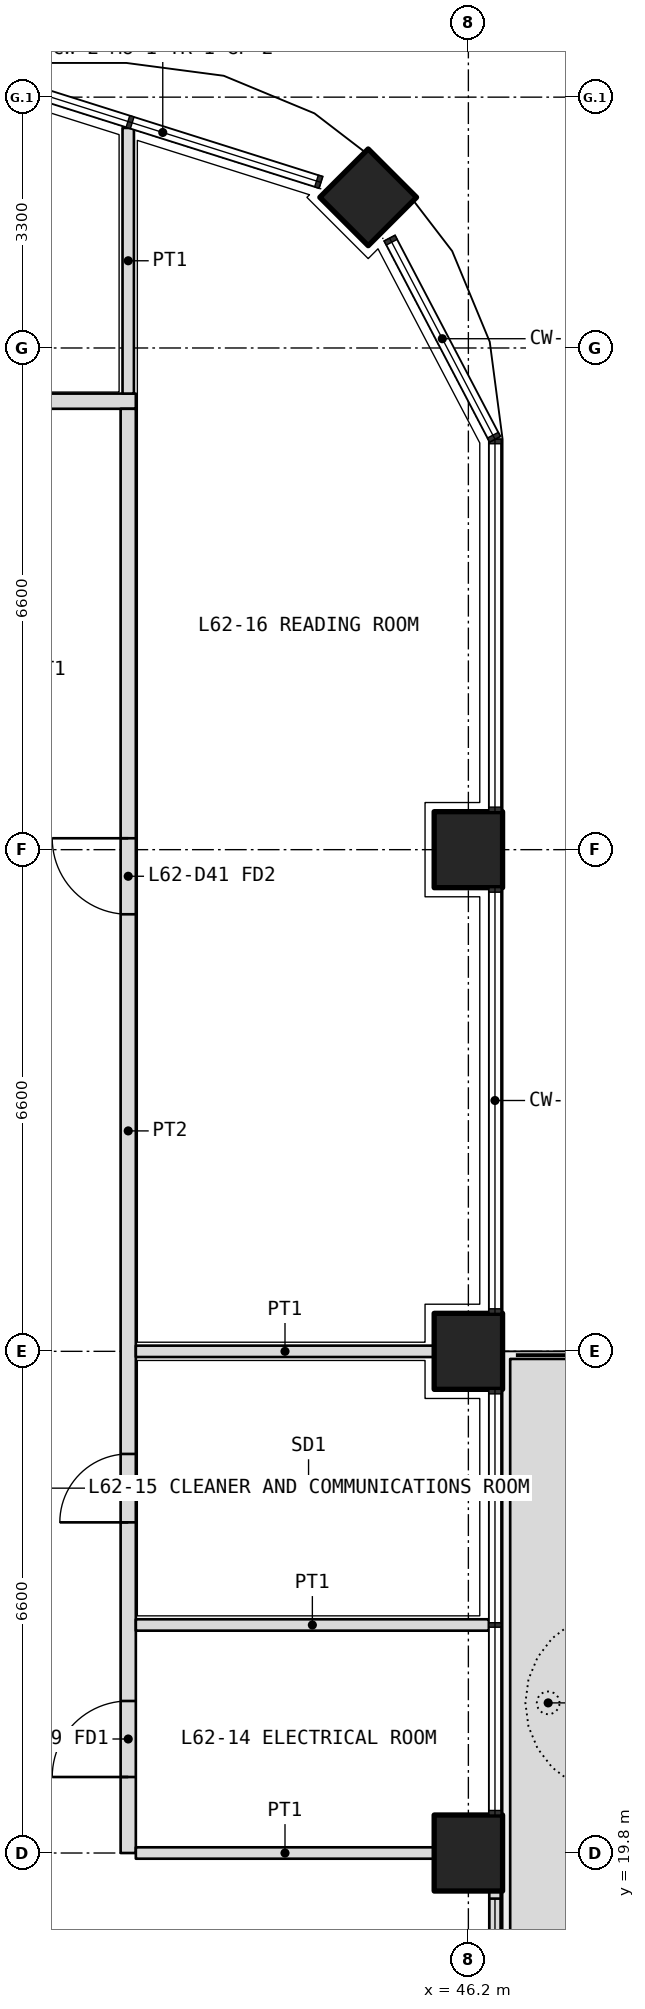
"""IFC4 building model, lengths in metres.
Left out: names, types, materials, properties, quantities, classifications, styles, units other than length and angle.
Written with IfcOpenShell. Run it as: python <this file> out.ifc"""

import sys

from ifc_helpers import new_model, si_unit, direction, frame, frame_2d, origin, origin_2d, place, context, subcontext, project, spatial, polyline, rectangle, outline, extrude, element, fill, save


model = new_model("IFC4")
c1 = context("Model", 3, precision=1e-05, world=origin(), true_north=direction((0.0, 1.0)))
c2 = subcontext(c1, "Body", "Model", "MODEL_VIEW")
j1 = project(units=[si_unit("LENGTHUNIT", "METRE"), si_unit("PLANEANGLEUNIT", "RADIAN")], contexts=[c1])
p1 = place(None, origin())
s1 = spatial("IfcSite", under=j1, at=p1, CompositionType="ELEMENT")
p2 = place(p1, origin())
s2 = spatial("IfcBuilding", under=s1, at=p2, CompositionType="ELEMENT")
p3 = place(p2, frame((0.0, 0.0, 271.2)))
s3 = spatial("IfcBuildingStorey", under=s2, at=p3, CompositionType="ELEMENT", Elevation=271.2)
p4 = place(p3, frame((44.882, 41.582, 0.0), z_axis=(0.0, 0.0, 1.0), x_axis=(0.707106781187, 0.707106781187, 0.0)))
e1 = element("IfcColumn", 1, at=p4, inside=s3, PredefinedType="COLUMN", context=c2, shape_type="SweptSolid", body=[
    extrude(rectangle(XDim=0.9, YDim=0.9, at=origin_2d()), origin(), (0.0, 0.0, 1.0), 4.2),
])
for number, where, z_axis, x_axis in (
    (2, (46.2, 19.8, 0.0), (0.0, 0.0, 1.0), (0.0, 1.0, 0.0)),
    (3, (46.2, 26.4, 0.0), (0.0, 0.0, 1.0), (0.0, 1.0, 0.0)),
    (4, (46.2, 33.0, 0.0), (0.0, 0.0, 1.0), (0.0, 1.0, 0.0)),
):
    element("IfcColumn", number, at=place(p3, frame(where, z_axis=z_axis, x_axis=x_axis)), inside=s3, PredefinedType="COLUMN", context=c2, shape_type="SweptSolid", body=[
        extrude(rectangle(XDim=1.0, YDim=0.9, at=origin_2d()), origin(), (0.0, 0.0, 1.0), 4.2),
    ])
p5 = place(p3, origin())
e5 = element("IfcWall", 5, at=p5, inside=s3, PredefinedType="USERDEFINED", context=c2, shape_type="SweptSolid", body=[
    extrude(outline(polyline([(46.75, 17.25), (47.75, 17.25), (47.75, 26.3), (46.75, 26.3), (46.75, 17.25)]), holes=[polyline([(46.9, 17.4), (47.6, 17.4), (47.6, 26.15), (46.9, 26.15), (46.9, 17.4)])]), origin(), (0.0, 0.0, 1.0), 1.05),
])
p6 = place(p3, frame((46.55, 13.7, 0.0), z_axis=(0.0, 0.0, 1.0), x_axis=(0.0, 1.0, 0.0)))
e6 = element("IfcWall", 6, at=p6, inside=s3, PredefinedType="SOLIDWALL", context=c2, shape_type="SweptSolid", body=[
    extrude(rectangle(XDim=5.6, YDim=0.15, at=frame_2d((2.8, 0.0))), origin(), (0.0, 0.0, 1.0), 2.7),
])
p7 = place(p6, frame((3.05, 0.0, 0.0)))
e7 = element("IfcOpeningElement", 7, at=p7, cuts=e6, PredefinedType="OPENING", context=c2, shape_type="SweptSolid", body=[
    extrude(rectangle(XDim=1.0, YDim=2.4, at=frame_2d((0.5, 1.2))), frame((0.0, 0.085, 0.0), z_axis=(0.0, -1.0, 0.0), x_axis=(1.0, 0.0, 0.0)), (0.0, 0.0, 1.0), 0.17),
])
p8 = place(p6, frame((0.1, 0.0, 0.1)))
e8 = element("IfcOpeningElement", 8, at=p8, cuts=e6, PredefinedType="OPENING", context=c2, shape_type="SweptSolid", body=[
    extrude(rectangle(XDim=2.45, YDim=2.3, at=frame_2d((1.225, 1.15))), frame((0.0, 0.085, 0.0), z_axis=(0.0, -1.0, 0.0), x_axis=(1.0, 0.0, 0.0)), (0.0, 0.0, 1.0), 0.17),
])
p9 = place(p6, frame((4.15, 0.0, 0.1)))
e9 = element("IfcOpeningElement", 9, at=p9, cuts=e6, PredefinedType="OPENING", context=c2, shape_type="SweptSolid", body=[
    extrude(rectangle(XDim=1.35, YDim=2.3, at=frame_2d((0.675, 1.15))), frame((0.0, 0.085, 0.0), z_axis=(0.0, -1.0, 0.0), x_axis=(1.0, 0.0, 0.0)), (0.0, 0.0, 1.0), 0.17),
])
p10 = place(p3, frame((10.975, 38.9, 0.0), z_axis=(0.0, 0.0, 1.0), x_axis=(1.0, 0.0, 0.0)))
e10 = element("IfcWall", 10, at=p10, inside=s3, PredefinedType="PARTITIONING", context=c2, shape_type="SweptSolid", body=[
    extrude(rectangle(XDim=30.85, YDim=0.2, at=frame_2d((15.425, 0.0))), origin(), (0.0, 0.0, 1.0), 3.0),
])
p11 = place(p10, frame((0.663, 0.0, 0.0)))
e11 = element("IfcOpeningElement", 11, at=p11, cuts=e10, PredefinedType="OPENING", context=c2, shape_type="SweptSolid", body=[
    extrude(rectangle(XDim=1.0, YDim=2.1, at=frame_2d((0.5, 1.05))), frame((0.0, 0.11, 0.0), z_axis=(0.0, -1.0, 0.0), x_axis=(1.0, 0.0, 0.0)), (0.0, 0.0, 1.0), 0.22),
])
p12 = place(p10, frame((3.375, 0.0, 0.0)))
e12 = element("IfcOpeningElement", 12, at=p12, cuts=e10, PredefinedType="OPENING", context=c2, shape_type="SweptSolid", body=[
    extrude(rectangle(XDim=1.0, YDim=2.1, at=frame_2d((0.5, 1.05))), frame((0.0, 0.11, 0.0), z_axis=(0.0, -1.0, 0.0), x_axis=(1.0, 0.0, 0.0)), (0.0, 0.0, 1.0), 0.22),
])
p13 = place(p10, frame((8.325, 0.0, 0.0)))
e13 = element("IfcOpeningElement", 13, at=p13, cuts=e10, PredefinedType="OPENING", context=c2, shape_type="SweptSolid", body=[
    extrude(rectangle(XDim=1.0, YDim=2.1, at=frame_2d((0.5, 1.05))), frame((0.0, 0.11, 0.0), z_axis=(0.0, -1.0, 0.0), x_axis=(1.0, 0.0, 0.0)), (0.0, 0.0, 1.0), 0.22),
])
p14 = place(p10, frame((13.275, 0.0, 0.0)))
e14 = element("IfcOpeningElement", 14, at=p14, cuts=e10, PredefinedType="OPENING", context=c2, shape_type="SweptSolid", body=[
    extrude(rectangle(XDim=1.0, YDim=2.1, at=frame_2d((0.5, 1.05))), frame((0.0, 0.11, 0.0), z_axis=(0.0, -1.0, 0.0), x_axis=(1.0, 0.0, 0.0)), (0.0, 0.0, 1.0), 0.22),
])
p15 = place(p10, frame((22.587, 0.0, 0.0)))
e15 = element("IfcOpeningElement", 15, at=p15, cuts=e10, PredefinedType="OPENING", context=c2, shape_type="SweptSolid", body=[
    extrude(rectangle(XDim=1.0, YDim=2.1, at=frame_2d((0.5, 1.05))), frame((0.0, 0.11, 0.0), z_axis=(0.0, -1.0, 0.0), x_axis=(1.0, 0.0, 0.0)), (0.0, 0.0, 1.0), 0.22),
])
p16 = place(p3, frame((41.725, 19.8, 0.0), z_axis=(0.0, 0.0, 1.0), x_axis=(0.0, 1.0, 0.0)))
e16 = element("IfcWall", 16, at=p16, inside=s3, PredefinedType="PARTITIONING", context=c2, shape_type="SweptSolid", body=[
    extrude(rectangle(XDim=19.0, YDim=0.2, at=frame_2d((9.5, 0.0))), origin(), (0.0, 0.0, 1.0), 3.0),
])
p17 = place(p16, frame((1.0, 0.0, 0.0)))
e17 = element("IfcOpeningElement", 17, at=p17, cuts=e16, PredefinedType="OPENING", context=c2, shape_type="SweptSolid", body=[
    extrude(rectangle(XDim=1.0, YDim=2.1, at=frame_2d((0.5, 1.05))), frame((0.0, 0.11, 0.0), z_axis=(0.0, -1.0, 0.0), x_axis=(1.0, 0.0, 0.0)), (0.0, 0.0, 1.0), 0.22),
])
p18 = place(p16, frame((4.35, 0.0, 0.0)))
e18 = element("IfcOpeningElement", 18, at=p18, cuts=e16, PredefinedType="OPENING", context=c2, shape_type="SweptSolid", body=[
    extrude(rectangle(XDim=0.9, YDim=2.1, at=frame_2d((0.45, 1.05))), frame((0.0, 0.11, 0.0), z_axis=(0.0, -1.0, 0.0), x_axis=(1.0, 0.0, 0.0)), (0.0, 0.0, 1.0), 0.22),
])
p19 = place(p16, frame((12.35, 0.0, 0.0)))
e19 = element("IfcOpeningElement", 19, at=p19, cuts=e16, PredefinedType="OPENING", context=c2, shape_type="SweptSolid", body=[
    extrude(rectangle(XDim=1.0, YDim=2.1, at=frame_2d((0.5, 1.05))), frame((0.0, 0.11, 0.0), z_axis=(0.0, -1.0, 0.0), x_axis=(1.0, 0.0, 0.0)), (0.0, 0.0, 1.0), 0.22),
])
p20 = place(p3, frame((41.725, 42.495, 0.0), z_axis=(0.0, 0.0, 1.0), x_axis=(0.0, -1.0, 0.0)))
e20 = element("IfcWall", 20, at=p20, inside=s3, PredefinedType="PARTITIONING", context=c2, shape_type="SweptSolid", body=[
    extrude(rectangle(XDim=3.495, YDim=0.15, at=frame_2d((1.748, 0.0))), origin(), (0.0, 0.0, 1.0), 2.7),
])
p21 = place(p3, frame((46.47, 22.8, 0.0), z_axis=(0.0, 0.0, 1.0), x_axis=(-1.0, 0.0, 0.0)))
e21 = element("IfcWall", 21, at=p21, inside=s3, PredefinedType="PARTITIONING", context=c2, shape_type="SweptSolid", body=[
    extrude(rectangle(XDim=4.645, YDim=0.15, at=frame_2d((2.323, 0.0))), origin(), (0.0, 0.0, 1.0), 2.7),
])
for number, where, z_axis, x_axis in (
    (22, (45.75, 26.4, 0.0), (0.0, 0.0, 1.0), (-1.0, 0.0, 0.0)),
    (23, (45.75, 19.8, 0.0), (0.0, 0.0, 1.0), (-1.0, 0.0, 0.0)),
):
    element("IfcWall", number, at=place(p3, frame(where, z_axis=z_axis, x_axis=x_axis)), inside=s3, PredefinedType="PARTITIONING", context=c2, shape_type="SweptSolid", body=[
        extrude(rectangle(XDim=3.925, YDim=0.15, at=frame_2d((1.962, 0.0))), origin(), (0.0, 0.0, 1.0), 3.0),
    ])
p22 = place(p9, origin())
e24 = element("IfcWindow", 24, at=p22, inside=s3, PartitioningType="SINGLE_PANEL", PredefinedType="WINDOW", context=c2, shape_type="SweptSolid", body=[
    extrude(rectangle(XDim=1.35, YDim=2.3, at=frame_2d((0.675, 1.15))), frame((0.0, 0.03, 0.0), z_axis=(0.0, -1.0, 0.0), x_axis=(1.0, 0.0, 0.0)), (0.0, 0.0, 1.0), 0.06),
])
fill(e9, e24)
p23 = place(p17, origin())
e25 = element("IfcDoor", 25, at=p23, inside=s3, OperationType="SINGLE_SWING_LEFT", PredefinedType="DOOR", context=c2, shape_type="SweptSolid", body=[
    extrude(rectangle(XDim=1.0, YDim=2.1, at=frame_2d((0.5, 1.05))), frame((0.0, 0.025, 0.0), z_axis=(0.0, -1.0, 0.0), x_axis=(1.0, 0.0, 0.0)), (0.0, 0.0, 1.0), 0.05),
])
fill(e17, e25)
p24 = place(p18, origin())
e26 = element("IfcDoor", 26, at=p24, inside=s3, OperationType="SINGLE_SWING_LEFT", PredefinedType="DOOR", context=c2, shape_type="SweptSolid", body=[
    extrude(rectangle(XDim=0.9, YDim=2.1, at=frame_2d((0.45, 1.05))), frame((0.0, 0.025, 0.0), z_axis=(0.0, -1.0, 0.0), x_axis=(1.0, 0.0, 0.0)), (0.0, 0.0, 1.0), 0.05),
])
fill(e18, e26)
p25 = place(p19, origin())
e27 = element("IfcDoor", 27, at=p25, inside=s3, OperationType="SINGLE_SWING_RIGHT", PredefinedType="DOOR", context=c2, shape_type="SweptSolid", body=[
    extrude(rectangle(XDim=1.0, YDim=2.1, at=frame_2d((0.5, 1.05))), frame((0.0, 0.025, 0.0), z_axis=(0.0, -1.0, 0.0), x_axis=(1.0, 0.0, 0.0)), (0.0, 0.0, 1.0), 0.05),
])
fill(e19, e27)
save(model, sys.argv[1])
